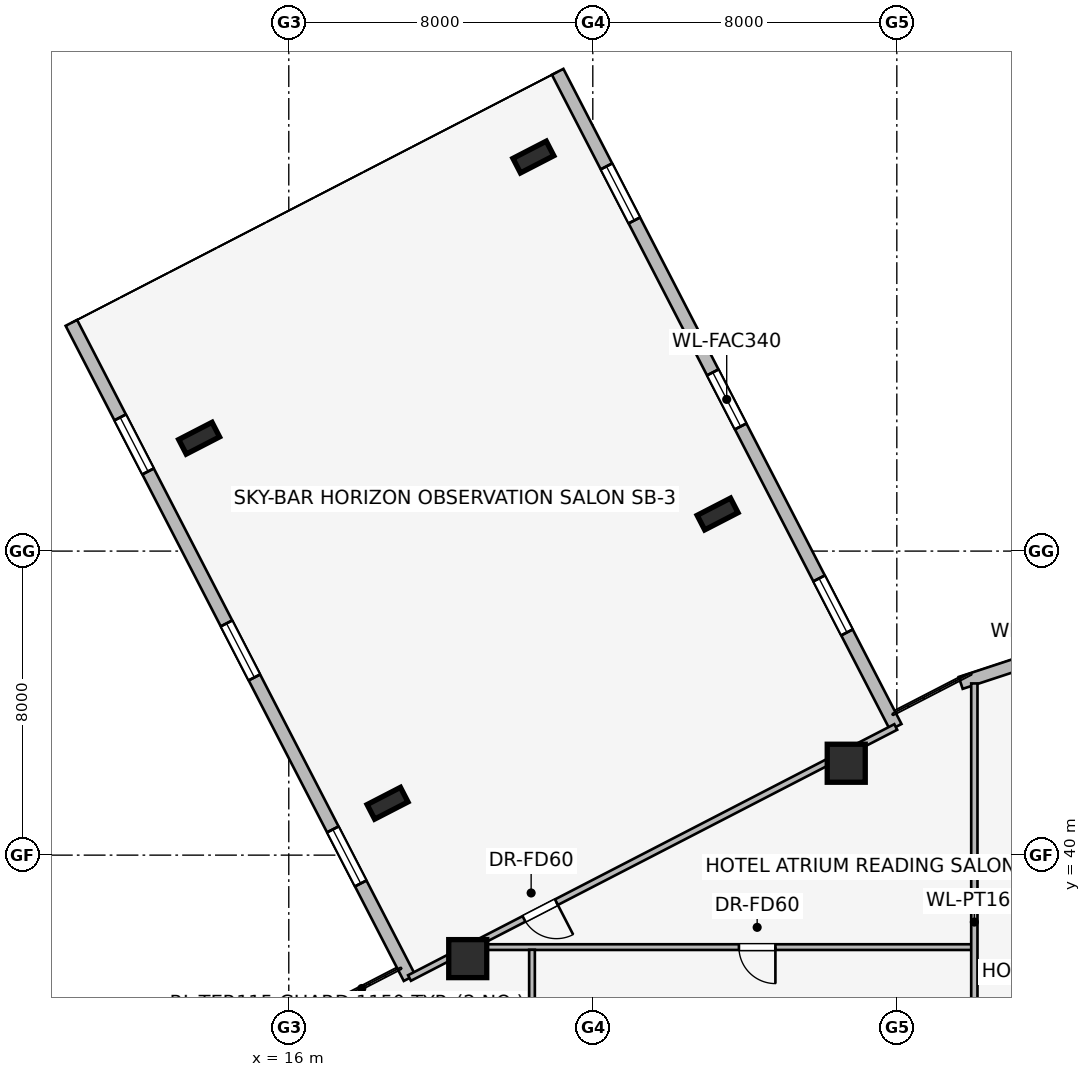
"""IFC4 building model, lengths in metres.
Left out: names, types, materials, properties, quantities, classifications, styles, units other than length and angle.
Written with IfcOpenShell. Run it as: python <this file> out.ifc"""

import sys

from ifc_helpers import new_model, si_unit, direction, frame, frame_2d, origin, origin_2d, place, context, subcontext, project, spatial, rectangle, i_section, extrude, element, fill, save


model = new_model("IFC4")
c1 = context("Model", 3, precision=1e-05, world=origin(), true_north=direction((0.0, 1.0)))
c2 = subcontext(c1, "Body", "Model", "MODEL_VIEW")
j1 = project(units=[si_unit("LENGTHUNIT", "METRE"), si_unit("PLANEANGLEUNIT", "RADIAN")], contexts=[c1])
p1 = place(None, origin())
s1 = spatial("IfcSite", under=j1, at=p1, CompositionType="ELEMENT")
p2 = place(p1, origin())
s2 = spatial("IfcBuilding", under=s1, at=p2, CompositionType="ELEMENT")
p3 = place(p2, frame((0.0, 0.0, 139.5)))
s3 = spatial("IfcBuildingStorey", under=s2, at=p3, CompositionType="ELEMENT", Elevation=139.5)
for number, where, z_axis, x_axis in (
    (1, (30.669, 42.418, 0.0), (0.0, 0.0, 1.0), (1.0, 0.0, 0.0)),
    (2, (20.709, 37.277, 0.0), (0.0, 0.0, 1.0), (1.0, 0.0, 0.0)),
):
    element("IfcColumn", number, at=place(p3, frame(where, z_axis=z_axis, x_axis=x_axis)), inside=s3, PredefinedType="COLUMN", context=c2, shape_type="SweptSolid", body=[
        extrude(rectangle(XDim=1.0, YDim=1.0, at=origin_2d()), origin(), (0.0, 0.0, 1.0), 3.45),
    ])
for number, where, z_axis, x_axis in (
    (3, (27.284, 48.976, -0.29), (0.0, 0.0, 1.0), (-0.459, 0.889, 0.0)),
    (4, (18.599, 41.365, -0.29), (0.0, 0.0, 1.0), (-0.459, 0.889, 0.0)),
    (5, (22.436, 58.368, -0.29), (0.0, 0.0, 1.0), (-0.459, 0.889, 0.0)),
    (6, (13.641, 50.97, -0.29), (0.0, 0.0, 1.0), (-0.459, 0.889, 0.0)),
):
    element("IfcColumn", number, at=place(p3, frame(where, z_axis=z_axis, x_axis=x_axis)), inside=s3, PredefinedType="COLUMN", context=c2, shape_type="SweptSolid", body=[
        extrude(i_section(OverallWidth=0.431, OverallDepth=0.987, WebThickness=0.034, FlangeThickness=0.062, at=origin_2d()), origin(), (0.0, 0.0, 1.0), 3.74),
    ])
p4 = place(p3, frame((33.681, 44.532, 0.0), z_axis=(0.0, 0.0, 1.0), x_axis=(0.949937416267, 0.312440242569, 0.0)))
e7 = element("IfcWall", 7, at=p4, inside=s3, PredefinedType="STANDARD", context=c2, shape_type="SweptSolid", body=[
    extrude(rectangle(XDim=1.722, YDim=0.33, at=frame_2d((0.861, 0.0))), origin(), (0.0, 0.0, 1.0), 3.16),
])
p5 = place(p3, frame((23.075, 60.611, 0.0), z_axis=(0.0, 0.0, 1.0), x_axis=(0.458619197522, -0.888632900395, 0.0)))
e8 = element("IfcWall", 8, at=p5, inside=s3, PredefinedType="STANDARD", context=c2, shape_type="SweptSolid", body=[
    extrude(rectangle(XDim=19.399, YDim=0.34, at=frame_2d((9.7, 0.0))), origin(), (0.0, 0.0, 1.0), 3.16),
])
p6 = place(p5, frame((2.8, 0.0, 0.75)))
e9 = element("IfcOpeningElement", 9, at=p6, cuts=e8, PredefinedType="OPENING", context=c2, shape_type="SweptSolid", body=[
    extrude(rectangle(XDim=1.6, YDim=1.55, at=frame_2d((0.8, 0.775))), frame((0.0, 0.18, 0.0), z_axis=(0.0, -1.0, 0.0), x_axis=(1.0, 0.0, 0.0)), (0.0, 0.0, 1.0), 0.36),
])
p7 = place(p5, frame((8.9, 0.0, 0.75)))
e10 = element("IfcOpeningElement", 10, at=p7, cuts=e8, PredefinedType="OPENING", context=c2, shape_type="SweptSolid", body=[
    extrude(rectangle(XDim=1.6, YDim=1.55, at=frame_2d((0.8, 0.775))), frame((0.0, 0.18, 0.0), z_axis=(0.0, -1.0, 0.0), x_axis=(1.0, 0.0, 0.0)), (0.0, 0.0, 1.0), 0.36),
])
p8 = place(p5, frame((15.0, 0.0, 0.75)))
e11 = element("IfcOpeningElement", 11, at=p8, cuts=e8, PredefinedType="OPENING", context=c2, shape_type="SweptSolid", body=[
    extrude(rectangle(XDim=1.6, YDim=1.55, at=frame_2d((0.8, 0.775))), frame((0.0, 0.18, 0.0), z_axis=(0.0, -1.0, 0.0), x_axis=(1.0, 0.0, 0.0)), (0.0, 0.0, 1.0), 0.36),
])
p9 = place(p3, frame((19.177, 36.767, 0.0), z_axis=(0.0, 0.0, 1.0), x_axis=(-0.458658947762, 0.88861238436, 0.0)))
e12 = element("IfcWall", 12, at=p9, inside=s3, PredefinedType="STANDARD", context=c2, shape_type="SweptSolid", body=[
    extrude(rectangle(XDim=19.4, YDim=0.34, at=frame_2d((9.7, 0.0))), origin(), (0.0, 0.0, 1.0), 3.16),
])
p10 = place(p9, frame((2.8, 0.0, 0.75)))
e13 = element("IfcOpeningElement", 13, at=p10, cuts=e12, PredefinedType="OPENING", context=c2, shape_type="SweptSolid", body=[
    extrude(rectangle(XDim=1.6, YDim=1.55, at=frame_2d((0.8, 0.775))), frame((0.0, 0.18, 0.0), z_axis=(0.0, -1.0, 0.0), x_axis=(1.0, 0.0, 0.0)), (0.0, 0.0, 1.0), 0.36),
])
p11 = place(p9, frame((8.9, 0.0, 0.75)))
e14 = element("IfcOpeningElement", 14, at=p11, cuts=e12, PredefinedType="OPENING", context=c2, shape_type="SweptSolid", body=[
    extrude(rectangle(XDim=1.6, YDim=1.55, at=frame_2d((0.8, 0.775))), frame((0.0, 0.18, 0.0), z_axis=(0.0, -1.0, 0.0), x_axis=(1.0, 0.0, 0.0)), (0.0, 0.0, 1.0), 0.36),
])
p12 = place(p9, frame((15.0, 0.0, 0.75)))
e15 = element("IfcOpeningElement", 15, at=p12, cuts=e12, PredefinedType="OPENING", context=c2, shape_type="SweptSolid", body=[
    extrude(rectangle(XDim=1.6, YDim=1.55, at=frame_2d((0.8, 0.775))), frame((0.0, 0.18, 0.0), z_axis=(0.0, -1.0, 0.0), x_axis=(1.0, 0.0, 0.0)), (0.0, 0.0, 1.0), 0.36),
])
p13 = place(p3, frame((34.0, 37.58, 0.0), z_axis=(0.0, 0.0, 1.0), x_axis=(-1.0, 0.0, 0.0)))
e16 = element("IfcWall", 16, at=p13, inside=s3, PredefinedType="PARTITIONING", context=c2, shape_type="SweptSolid", body=[
    extrude(rectangle(XDim=13.707, YDim=0.15, at=frame_2d((6.854, 0.0))), origin(), (0.0, 0.0, 1.0), 2.627),
])
p14 = place(p13, frame((5.195, 0.0, 0.0)))
e17 = element("IfcOpeningElement", 17, at=p14, cuts=e16, PredefinedType="OPENING", context=c2, shape_type="SweptSolid", body=[
    extrude(rectangle(XDim=0.96, YDim=2.0, at=frame_2d((0.48, 1.0))), frame((0.0, 0.085, 0.0), z_axis=(0.0, -1.0, 0.0), x_axis=(1.0, 0.0, 0.0)), (0.0, 0.0, 1.0), 0.17),
])
p15 = place(p3, frame((34.04, 31.96, 0.0), z_axis=(0.0, 0.0, 1.0), x_axis=(0.0, 1.0, 0.0)))
e18 = element("IfcWall", 18, at=p15, inside=s3, PredefinedType="PARTITIONING", context=c2, shape_type="SweptSolid", body=[
    extrude(rectangle(XDim=12.558, YDim=0.165, at=frame_2d((6.279, 0.0))), origin(), (0.0, 0.0, 1.0), 3.16),
])
p16 = place(p3, frame((31.972, 43.372, 0.0), z_axis=(0.0, 0.0, 1.0), x_axis=(-0.888588109751, -0.458705974683, 0.0)))
e19 = element("IfcWall", 19, at=p16, inside=s3, PredefinedType="PARTITIONING", context=c2, shape_type="SweptSolid", body=[
    extrude(rectangle(XDim=14.399, YDim=0.165, at=frame_2d((7.2, 0.0))), origin(), (0.0, 0.0, 1.0), 2.532),
])
p17 = place(p16, frame((10.049, 0.0, 0.0)))
e20 = element("IfcOpeningElement", 20, at=p17, cuts=e19, PredefinedType="OPENING", context=c2, shape_type="SweptSolid", body=[
    extrude(rectangle(XDim=0.96, YDim=2.0, at=frame_2d((0.48, 1.0))), frame((0.0, 0.093, 0.0), z_axis=(0.0, -1.0, 0.0), x_axis=(1.0, 0.0, 0.0)), (0.0, 0.0, 1.0), 0.185),
])
p18 = place(p3, frame((22.4, 36.08, 0.0), z_axis=(0.0, 0.0, 1.0), x_axis=(0.0, 1.0, 0.0)))
e21 = element("IfcWall", 21, at=p18, inside=s3, PredefinedType="PARTITIONING", context=c2, shape_type="SweptSolid", body=[
    extrude(rectangle(XDim=1.43, YDim=0.15, at=frame_2d((0.715, 0.0))), origin(), (0.0, 0.0, 1.0), 3.16),
])
p19 = place(p6, origin())
e22 = element("IfcWindow", 22, at=p19, inside=s3, PartitioningType="SINGLE_PANEL", PredefinedType="WINDOW", context=c2, shape_type="SweptSolid", body=[
    extrude(rectangle(XDim=1.6, YDim=1.55, at=frame_2d((0.8, 0.775))), frame((0.0, 0.03, 0.0), z_axis=(0.0, -1.0, 0.0), x_axis=(1.0, 0.0, 0.0)), (0.0, 0.0, 1.0), 0.06),
])
fill(e9, e22)
p20 = place(p7, origin())
e23 = element("IfcWindow", 23, at=p20, inside=s3, PartitioningType="SINGLE_PANEL", PredefinedType="WINDOW", context=c2, shape_type="SweptSolid", body=[
    extrude(rectangle(XDim=1.6, YDim=1.55, at=frame_2d((0.8, 0.775))), frame((0.0, 0.03, 0.0), z_axis=(0.0, -1.0, 0.0), x_axis=(1.0, 0.0, 0.0)), (0.0, 0.0, 1.0), 0.06),
])
fill(e10, e23)
p21 = place(p8, origin())
e24 = element("IfcWindow", 24, at=p21, inside=s3, PartitioningType="SINGLE_PANEL", PredefinedType="WINDOW", context=c2, shape_type="SweptSolid", body=[
    extrude(rectangle(XDim=1.6, YDim=1.55, at=frame_2d((0.8, 0.775))), frame((0.0, 0.03, 0.0), z_axis=(0.0, -1.0, 0.0), x_axis=(1.0, 0.0, 0.0)), (0.0, 0.0, 1.0), 0.06),
])
fill(e11, e24)
p22 = place(p10, origin())
e25 = element("IfcWindow", 25, at=p22, inside=s3, PartitioningType="SINGLE_PANEL", PredefinedType="WINDOW", context=c2, shape_type="SweptSolid", body=[
    extrude(rectangle(XDim=1.6, YDim=1.55, at=frame_2d((0.8, 0.775))), frame((0.0, 0.03, 0.0), z_axis=(0.0, -1.0, 0.0), x_axis=(1.0, 0.0, 0.0)), (0.0, 0.0, 1.0), 0.06),
])
fill(e13, e25)
p23 = place(p11, origin())
e26 = element("IfcWindow", 26, at=p23, inside=s3, PartitioningType="SINGLE_PANEL", PredefinedType="WINDOW", context=c2, shape_type="SweptSolid", body=[
    extrude(rectangle(XDim=1.6, YDim=1.55, at=frame_2d((0.8, 0.775))), frame((0.0, 0.03, 0.0), z_axis=(0.0, -1.0, 0.0), x_axis=(1.0, 0.0, 0.0)), (0.0, 0.0, 1.0), 0.06),
])
fill(e14, e26)
p24 = place(p12, origin())
e27 = element("IfcWindow", 27, at=p24, inside=s3, PartitioningType="SINGLE_PANEL", PredefinedType="WINDOW", context=c2, shape_type="SweptSolid", body=[
    extrude(rectangle(XDim=1.6, YDim=1.55, at=frame_2d((0.8, 0.775))), frame((0.0, 0.03, 0.0), z_axis=(0.0, -1.0, 0.0), x_axis=(1.0, 0.0, 0.0)), (0.0, 0.0, 1.0), 0.06),
])
fill(e15, e27)
p25 = place(p14, origin())
e28 = element("IfcDoor", 28, at=p25, inside=s3, OperationType="SINGLE_SWING_LEFT", PredefinedType="DOOR", context=c2, shape_type="SweptSolid", body=[
    extrude(rectangle(XDim=0.96, YDim=2.0, at=frame_2d((0.48, 1.0))), frame((0.0, 0.025, 0.0), z_axis=(0.0, -1.0, 0.0), x_axis=(1.0, 0.0, 0.0)), (0.0, 0.0, 1.0), 0.05),
])
fill(e17, e28)
p26 = place(p17, origin())
e29 = element("IfcDoor", 29, at=p26, inside=s3, OperationType="SINGLE_SWING_LEFT", PredefinedType="DOOR", context=c2, shape_type="SweptSolid", body=[
    extrude(rectangle(XDim=0.96, YDim=2.0, at=frame_2d((0.48, 1.0))), frame((0.0, 0.025, 0.0), z_axis=(0.0, -1.0, 0.0), x_axis=(1.0, 0.0, 0.0)), (0.0, 0.0, 1.0), 0.05),
])
fill(e20, e29)
save(model, sys.argv[1])
